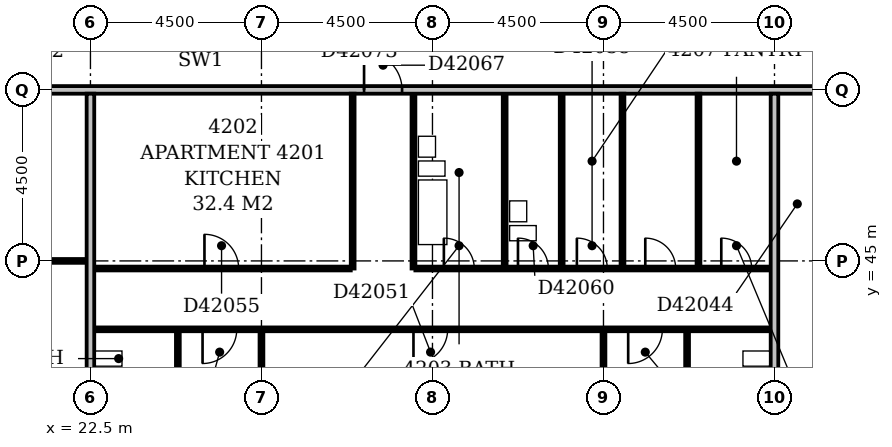
"""IFC4 building model, lengths in metres.
Left out: names, types, materials, properties, quantities, classifications, styles, units other than length and angle.
Written with IfcOpenShell. Run it as: python <this file> out.ifc"""

import sys

from ifc_helpers import new_model, si_unit, direction, frame, frame_2d, origin, place, context, subcontext, project, spatial, rectangle, extrude, element, fill, save


model = new_model("IFC4")
c1 = context("Model", 3, precision=1e-05, world=origin(), true_north=direction((0.0, 1.0)))
c2 = subcontext(c1, "Body", "Model", "MODEL_VIEW")
j1 = project(units=[si_unit("LENGTHUNIT", "METRE"), si_unit("PLANEANGLEUNIT", "RADIAN")], contexts=[c1])
p1 = place(None, origin())
s1 = spatial("IfcSite", under=j1, at=p1, CompositionType="ELEMENT")
p2 = place(p1, origin())
s2 = spatial("IfcBuilding", under=s1, at=p2, CompositionType="ELEMENT")
p3 = place(p2, frame((0.0, 0.0, 166.4)))
s3 = spatial("IfcBuildingStorey", under=s2, at=p3, CompositionType="ELEMENT", Elevation=166.4)
p4 = place(p3, frame((22.5, 36.5, 0.0), z_axis=(0.0, 0.0, 1.0), x_axis=(0.0, 1.0, 0.0)))
e1 = element("IfcWall", 1, at=p4, inside=s3, PredefinedType="PARTITIONING", context=c2, shape_type="SweptSolid", body=[
    extrude(rectangle(XDim=12.9, YDim=0.2, at=frame_2d((6.45, 0.0))), origin(), (0.0, 0.0, 1.0), 3.3),
])
p5 = place(p3, frame((27.0, 36.5, 0.0), z_axis=(0.0, 0.0, 1.0), x_axis=(0.0, 1.0, 0.0)))
e2 = element("IfcWall", 2, at=p5, inside=s3, PredefinedType="PARTITIONING", context=c2, shape_type="SweptSolid", body=[
    extrude(rectangle(XDim=6.65, YDim=0.1, at=frame_2d((3.325, 0.0))), origin(), (0.0, 0.0, 1.0), 2.6),
])
p6 = place(p3, frame((36.0, 36.5, 0.0), z_axis=(0.0, 0.0, 1.0), x_axis=(0.0, 1.0, 0.0)))
e3 = element("IfcWall", 3, at=p6, inside=s3, PredefinedType="PARTITIONING", context=c2, shape_type="SweptSolid", body=[
    extrude(rectangle(XDim=6.65, YDim=0.1, at=frame_2d((3.325, 0.0))), origin(), (0.0, 0.0, 1.0), 2.4),
])
p7 = place(p3, frame((40.5, 36.5, 0.0), z_axis=(0.0, 0.0, 1.0), x_axis=(0.0, 1.0, 0.0)))
e4 = element("IfcWall", 4, at=p7, inside=s3, PredefinedType="PARTITIONING", context=c2, shape_type="SweptSolid", body=[
    extrude(rectangle(XDim=12.9, YDim=0.2, at=frame_2d((6.45, 0.0))), origin(), (0.0, 0.0, 1.0), 3.3),
])
p8 = place(p3, frame((24.8, 40.3, 0.0), z_axis=(0.0, 0.0, 1.0), x_axis=(0.0, 1.0, 0.0)))
e5 = element("IfcWall", 5, at=p8, inside=s3, PredefinedType="PLUMBINGWALL", context=c2, shape_type="SweptSolid", body=[
    extrude(rectangle(XDim=2.85, YDim=0.1, at=frame_2d((1.425, 0.0))), origin(), (0.0, 0.0, 1.0), 3.3),
])
p9 = place(p8, frame((1.05, 0.0, 0.0)))
e6 = element("IfcOpeningElement", 6, at=p9, cuts=e5, PredefinedType="OPENING", context=c2, shape_type="SweptSolid", body=[
    extrude(rectangle(XDim=0.8, YDim=2.1, at=frame_2d((0.4, 1.05))), frame((0.0, 0.062, 0.0), z_axis=(0.0, -1.0, 0.0), x_axis=(1.0, 0.0, 0.0)), (0.0, 0.0, 1.0), 0.124),
])
p10 = place(p3, frame((38.2, 40.3, 0.0), z_axis=(0.0, 0.0, 1.0), x_axis=(0.0, 1.0, 0.0)))
e7 = element("IfcWall", 7, at=p10, inside=s3, PredefinedType="PLUMBINGWALL", context=c2, shape_type="SweptSolid", body=[
    extrude(rectangle(XDim=2.85, YDim=0.1, at=frame_2d((1.425, 0.0))), origin(), (0.0, 0.0, 1.0), 3.3),
])
p11 = place(p10, frame((1.05, 0.0, 0.0)))
e8 = element("IfcOpeningElement", 8, at=p11, cuts=e7, PredefinedType="OPENING", context=c2, shape_type="SweptSolid", body=[
    extrude(rectangle(XDim=0.8, YDim=2.1, at=frame_2d((0.4, 1.05))), frame((0.0, 0.062, 0.0), z_axis=(0.0, -1.0, 0.0), x_axis=(1.0, 0.0, 0.0)), (0.0, 0.0, 1.0), 0.124),
])
p12 = place(p3, frame((22.6, 43.2, 0.0), z_axis=(0.0, 0.0, 1.0), x_axis=(1.0, 0.0, 0.0)))
e9 = element("IfcWall", 9, at=p12, inside=s3, PredefinedType="PARTITIONING", context=c2, shape_type="SweptSolid", body=[
    extrude(rectangle(XDim=17.8, YDim=0.1, at=frame_2d((8.9, 0.0))), origin(), (0.0, 0.0, 1.0), 3.3),
])
p13 = place(p12, frame((2.85, 0.0, 0.0)))
e10 = element("IfcOpeningElement", 10, at=p13, cuts=e9, PredefinedType="OPENING", context=c2, shape_type="SweptSolid", body=[
    extrude(rectangle(XDim=0.9, YDim=2.1, at=frame_2d((0.45, 1.05))), frame((0.0, 0.062, 0.0), z_axis=(0.0, -1.0, 0.0), x_axis=(1.0, 0.0, 0.0)), (0.0, 0.0, 1.0), 0.124),
])
p14 = place(p12, frame((8.4, 0.0, 0.0)))
e11 = element("IfcOpeningElement", 11, at=p14, cuts=e9, PredefinedType="OPENING", context=c2, shape_type="SweptSolid", body=[
    extrude(rectangle(XDim=0.9, YDim=2.1, at=frame_2d((0.45, 1.05))), frame((0.0, 0.062, 0.0), z_axis=(0.0, -1.0, 0.0), x_axis=(1.0, 0.0, 0.0)), (0.0, 0.0, 1.0), 0.124),
])
p15 = place(p12, frame((14.05, 0.0, 0.0)))
e12 = element("IfcOpeningElement", 12, at=p15, cuts=e9, PredefinedType="OPENING", context=c2, shape_type="SweptSolid", body=[
    extrude(rectangle(XDim=0.9, YDim=2.1, at=frame_2d((0.45, 1.05))), frame((0.0, 0.062, 0.0), z_axis=(0.0, -1.0, 0.0), x_axis=(1.0, 0.0, 0.0)), (0.0, 0.0, 1.0), 0.124),
])
p16 = place(p3, frame((22.6, 44.8, 0.0), z_axis=(0.0, 0.0, 1.0), x_axis=(1.0, 0.0, 0.0)))
e13 = element("IfcWall", 13, at=p16, inside=s3, PredefinedType="PARTITIONING", context=c2, shape_type="SweptSolid", body=[
    extrude(rectangle(XDim=6.75, YDim=0.1, at=frame_2d((3.375, 0.0))), origin(), (0.0, 0.0, 1.0), 3.3),
])
p17 = place(p16, frame((2.9, 0.0, 0.0)))
e14 = element("IfcOpeningElement", 14, at=p17, cuts=e13, PredefinedType="OPENING", context=c2, shape_type="SweptSolid", body=[
    extrude(rectangle(XDim=0.9, YDim=2.1, at=frame_2d((0.45, 1.05))), frame((0.0, 0.062, 0.0), z_axis=(0.0, -1.0, 0.0), x_axis=(1.0, 0.0, 0.0)), (0.0, 0.0, 1.0), 0.124),
])
p18 = place(p3, frame((29.4, 44.8, 0.0), z_axis=(0.0, 0.0, 1.0), x_axis=(0.0, 1.0, 0.0)))
e15 = element("IfcWall", 15, at=p18, inside=s3, PredefinedType="PARTITIONING", context=c2, shape_type="SweptSolid", body=[
    extrude(rectangle(XDim=4.6, YDim=0.1, at=frame_2d((2.3, 0.0))), origin(), (0.0, 0.0, 1.0), 3.3),
])
p19 = place(p3, frame((31.0, 44.8, 0.0), z_axis=(0.0, 0.0, 1.0), x_axis=(0.0, 1.0, 0.0)))
e16 = element("IfcWall", 16, at=p19, inside=s3, PredefinedType="PLUMBINGWALL", context=c2, shape_type="SweptSolid", body=[
    extrude(rectangle(XDim=4.6, YDim=0.1, at=frame_2d((2.3, 0.0))), origin(), (0.0, 0.0, 1.0), 3.3),
])
p20 = place(p3, frame((31.05, 44.8, 0.0), z_axis=(0.0, 0.0, 1.0), x_axis=(1.0, 0.0, 0.0)))
e17 = element("IfcWall", 17, at=p20, inside=s3, PredefinedType="PARTITIONING", context=c2, shape_type="SweptSolid", body=[
    extrude(rectangle(XDim=9.35, YDim=0.1, at=frame_2d((4.675, 0.0))), origin(), (0.0, 0.0, 1.0), 3.3),
])
p21 = place(p20, frame((0.75, 0.0, 0.0)))
e18 = element("IfcOpeningElement", 18, at=p21, cuts=e17, PredefinedType="OPENING", context=c2, shape_type="SweptSolid", body=[
    extrude(rectangle(XDim=0.8, YDim=2.1, at=frame_2d((0.4, 1.05))), frame((0.0, 0.062, 0.0), z_axis=(0.0, -1.0, 0.0), x_axis=(1.0, 0.0, 0.0)), (0.0, 0.0, 1.0), 0.124),
])
p22 = place(p20, frame((8.05, 0.0, 0.0)))
e19 = element("IfcOpeningElement", 19, at=p22, cuts=e17, PredefinedType="OPENING", context=c2, shape_type="SweptSolid", body=[
    extrude(rectangle(XDim=0.8, YDim=2.1, at=frame_2d((0.4, 1.05))), frame((0.0, 0.062, 0.0), z_axis=(0.0, -1.0, 0.0), x_axis=(1.0, 0.0, 0.0)), (0.0, 0.0, 1.0), 0.124),
])
p23 = place(p20, frame((4.25, 0.0, 0.0)))
e20 = element("IfcOpeningElement", 20, at=p23, cuts=e17, PredefinedType="OPENING", context=c2, shape_type="SweptSolid", body=[
    extrude(rectangle(XDim=0.8, YDim=2.1, at=frame_2d((0.4, 1.05))), frame((0.0, 0.062, 0.0), z_axis=(0.0, -1.0, 0.0), x_axis=(1.0, 0.0, 0.0)), (0.0, 0.0, 1.0), 0.124),
])
p24 = place(p20, frame((6.05, 0.0, 0.0)))
e21 = element("IfcOpeningElement", 21, at=p24, cuts=e17, PredefinedType="OPENING", context=c2, shape_type="SweptSolid", body=[
    extrude(rectangle(XDim=0.8, YDim=2.1, at=frame_2d((0.4, 1.05))), frame((0.0, 0.062, 0.0), z_axis=(0.0, -1.0, 0.0), x_axis=(1.0, 0.0, 0.0)), (0.0, 0.0, 1.0), 0.124),
])
p25 = place(p20, frame((2.7, 0.0, 0.0)))
e22 = element("IfcOpeningElement", 22, at=p25, cuts=e17, PredefinedType="OPENING", context=c2, shape_type="SweptSolid", body=[
    extrude(rectangle(XDim=0.8, YDim=2.1, at=frame_2d((0.4, 1.05))), frame((0.0, 0.062, 0.0), z_axis=(0.0, -1.0, 0.0), x_axis=(1.0, 0.0, 0.0)), (0.0, 0.0, 1.0), 0.124),
])
for number, where, z_axis, x_axis in (
    (23, (33.4, 44.85, 0.0), (0.0, 0.0, 1.0), (0.0, 1.0, 0.0)),
    (24, (34.9, 44.85, 0.0), (0.0, 0.0, 1.0), (0.0, 1.0, 0.0)),
):
    element("IfcWall", number, at=place(p3, frame(where, z_axis=z_axis, x_axis=x_axis)), inside=s3, PredefinedType="PLUMBINGWALL", context=c2, shape_type="SweptSolid", body=[
        extrude(rectangle(XDim=4.55, YDim=0.1, at=frame_2d((2.275, 0.0))), origin(), (0.0, 0.0, 1.0), 3.3),
    ])
p26 = place(p3, frame((36.5, 44.85, 0.0), z_axis=(0.0, 0.0, 1.0), x_axis=(0.0, 1.0, 0.0)))
e25 = element("IfcWall", 25, at=p26, inside=s3, PredefinedType="PARTITIONING", context=c2, shape_type="SweptSolid", body=[
    extrude(rectangle(XDim=4.55, YDim=0.1, at=frame_2d((2.275, 0.0))), origin(), (0.0, 0.0, 1.0), 2.4),
])
p27 = place(p3, frame((38.5, 44.85, 0.0), z_axis=(0.0, 0.0, 1.0), x_axis=(0.0, 1.0, 0.0)))
e26 = element("IfcWall", 26, at=p27, inside=s3, PredefinedType="PARTITIONING", context=c2, shape_type="SweptSolid", body=[
    extrude(rectangle(XDim=4.55, YDim=0.1, at=frame_2d((2.275, 0.0))), origin(), (0.0, 0.0, 1.0), 3.3),
])
p28 = place(p3, frame((9.1, 45.0, 0.0), z_axis=(0.0, 0.0, 1.0), x_axis=(1.0, 0.0, 0.0)))
e27 = element("IfcWall", 27, at=p28, inside=s3, PredefinedType="PARTITIONING", context=c2, shape_type="SweptSolid", body=[
    extrude(rectangle(XDim=13.3, YDim=0.1, at=frame_2d((6.65, 0.0))), origin(), (0.0, 0.0, 1.0), 3.3),
])
p29 = place(p3, frame((9.1, 49.5, 0.0), z_axis=(0.0, 0.0, 1.0), x_axis=(1.0, 0.0, 0.0)))
e28 = element("IfcWall", 28, at=p29, inside=s3, PredefinedType="PARTITIONING", context=c2, shape_type="SweptSolid", body=[
    extrude(rectangle(XDim=32.55, YDim=0.2, at=frame_2d((16.275, 0.0))), origin(), (0.0, 0.0, 1.0), 3.3),
])
p30 = place(p29, frame((20.6, 0.0, 0.0)))
e29 = element("IfcOpeningElement", 29, at=p30, cuts=e28, PredefinedType="OPENING", context=c2, shape_type="SweptSolid", body=[
    extrude(rectangle(XDim=1.0, YDim=2.1, at=frame_2d((0.5, 1.05))), frame((0.0, 0.112, 0.0), z_axis=(0.0, -1.0, 0.0), x_axis=(1.0, 0.0, 0.0)), (0.0, 0.0, 1.0), 0.224),
])
p31 = place(p29, frame((6.15, 0.0, 0.0)))
e30 = element("IfcOpeningElement", 30, at=p31, cuts=e28, PredefinedType="OPENING", context=c2, shape_type="SweptSolid", body=[
    extrude(rectangle(XDim=0.9, YDim=2.1, at=frame_2d((0.45, 1.05))), frame((0.0, 0.112, 0.0), z_axis=(0.0, -1.0, 0.0), x_axis=(1.0, 0.0, 0.0)), (0.0, 0.0, 1.0), 0.224),
])
p32 = place(p13, frame((0.9, 0.0, 0.0), z_axis=(0.0, 0.0, 1.0), x_axis=(-1.0, 0.0, 0.0)))
e31 = element("IfcDoor", 31, at=p32, inside=s3, OperationType="SINGLE_SWING_RIGHT", PredefinedType="DOOR", context=c2, shape_type="SweptSolid", body=[
    extrude(rectangle(XDim=0.9, YDim=2.1, at=frame_2d((0.45, 1.05))), frame((0.0, 0.025, 0.0), z_axis=(0.0, -1.0, 0.0), x_axis=(1.0, 0.0, 0.0)), (0.0, 0.0, 1.0), 0.05),
])
fill(e10, e31)
p33 = place(p14, frame((0.9, 0.0, 0.0), z_axis=(0.0, 0.0, 1.0), x_axis=(-1.0, 0.0, 0.0)))
e32 = element("IfcDoor", 32, at=p33, inside=s3, OperationType="SINGLE_SWING_RIGHT", PredefinedType="DOOR", context=c2, shape_type="SweptSolid", body=[
    extrude(rectangle(XDim=0.9, YDim=2.1, at=frame_2d((0.45, 1.05))), frame((0.0, 0.025, 0.0), z_axis=(0.0, -1.0, 0.0), x_axis=(1.0, 0.0, 0.0)), (0.0, 0.0, 1.0), 0.05),
])
fill(e11, e32)
p34 = place(p15, frame((0.9, 0.0, 0.0), z_axis=(0.0, 0.0, 1.0), x_axis=(-1.0, 0.0, 0.0)))
e33 = element("IfcDoor", 33, at=p34, inside=s3, OperationType="SINGLE_SWING_RIGHT", PredefinedType="DOOR", context=c2, shape_type="SweptSolid", body=[
    extrude(rectangle(XDim=0.9, YDim=2.1, at=frame_2d((0.45, 1.05))), frame((0.0, 0.025, 0.0), z_axis=(0.0, -1.0, 0.0), x_axis=(1.0, 0.0, 0.0)), (0.0, 0.0, 1.0), 0.05),
])
fill(e12, e33)
p35 = place(p17, origin())
e34 = element("IfcDoor", 34, at=p35, inside=s3, OperationType="SINGLE_SWING_LEFT", PredefinedType="DOOR", context=c2, shape_type="SweptSolid", body=[
    extrude(rectangle(XDim=0.9, YDim=2.1, at=frame_2d((0.45, 1.05))), frame((0.0, 0.025, 0.0), z_axis=(0.0, -1.0, 0.0), x_axis=(1.0, 0.0, 0.0)), (0.0, 0.0, 1.0), 0.05),
])
fill(e14, e34)
p36 = place(p21, origin())
e35 = element("IfcDoor", 35, at=p36, inside=s3, OperationType="SINGLE_SWING_LEFT", PredefinedType="DOOR", context=c2, shape_type="SweptSolid", body=[
    extrude(rectangle(XDim=0.8, YDim=2.1, at=frame_2d((0.4, 1.05))), frame((0.0, 0.025, 0.0), z_axis=(0.0, -1.0, 0.0), x_axis=(1.0, 0.0, 0.0)), (0.0, 0.0, 1.0), 0.05),
])
fill(e18, e35)
p37 = place(p22, origin())
e36 = element("IfcDoor", 36, at=p37, inside=s3, OperationType="SINGLE_SWING_LEFT", PredefinedType="DOOR", context=c2, shape_type="SweptSolid", body=[
    extrude(rectangle(XDim=0.8, YDim=2.1, at=frame_2d((0.4, 1.05))), frame((0.0, 0.025, 0.0), z_axis=(0.0, -1.0, 0.0), x_axis=(1.0, 0.0, 0.0)), (0.0, 0.0, 1.0), 0.05),
])
fill(e19, e36)
p38 = place(p23, origin())
e37 = element("IfcDoor", 37, at=p38, inside=s3, OperationType="SINGLE_SWING_LEFT", PredefinedType="DOOR", context=c2, shape_type="SweptSolid", body=[
    extrude(rectangle(XDim=0.8, YDim=2.1, at=frame_2d((0.4, 1.05))), frame((0.0, 0.025, 0.0), z_axis=(0.0, -1.0, 0.0), x_axis=(1.0, 0.0, 0.0)), (0.0, 0.0, 1.0), 0.05),
])
fill(e20, e37)
p39 = place(p24, origin())
e38 = element("IfcDoor", 38, at=p39, inside=s3, OperationType="SINGLE_SWING_LEFT", PredefinedType="DOOR", context=c2, shape_type="SweptSolid", body=[
    extrude(rectangle(XDim=0.8, YDim=2.1, at=frame_2d((0.4, 1.05))), frame((0.0, 0.025, 0.0), z_axis=(0.0, -1.0, 0.0), x_axis=(1.0, 0.0, 0.0)), (0.0, 0.0, 1.0), 0.05),
])
fill(e21, e38)
p40 = place(p25, origin())
e39 = element("IfcDoor", 39, at=p40, inside=s3, OperationType="SINGLE_SWING_LEFT", PredefinedType="DOOR", context=c2, shape_type="SweptSolid", body=[
    extrude(rectangle(XDim=0.8, YDim=2.1, at=frame_2d((0.4, 1.05))), frame((0.0, 0.025, 0.0), z_axis=(0.0, -1.0, 0.0), x_axis=(1.0, 0.0, 0.0)), (0.0, 0.0, 1.0), 0.05),
])
fill(e22, e39)
p41 = place(p30, origin())
e40 = element("IfcDoor", 40, at=p41, inside=s3, OperationType="SINGLE_SWING_LEFT", PredefinedType="DOOR", context=c2, shape_type="SweptSolid", body=[
    extrude(rectangle(XDim=1.0, YDim=2.1, at=frame_2d((0.5, 1.05))), frame((0.0, 0.025, 0.0), z_axis=(0.0, -1.0, 0.0), x_axis=(1.0, 0.0, 0.0)), (0.0, 0.0, 1.0), 0.05),
])
fill(e29, e40)
save(model, sys.argv[1])
